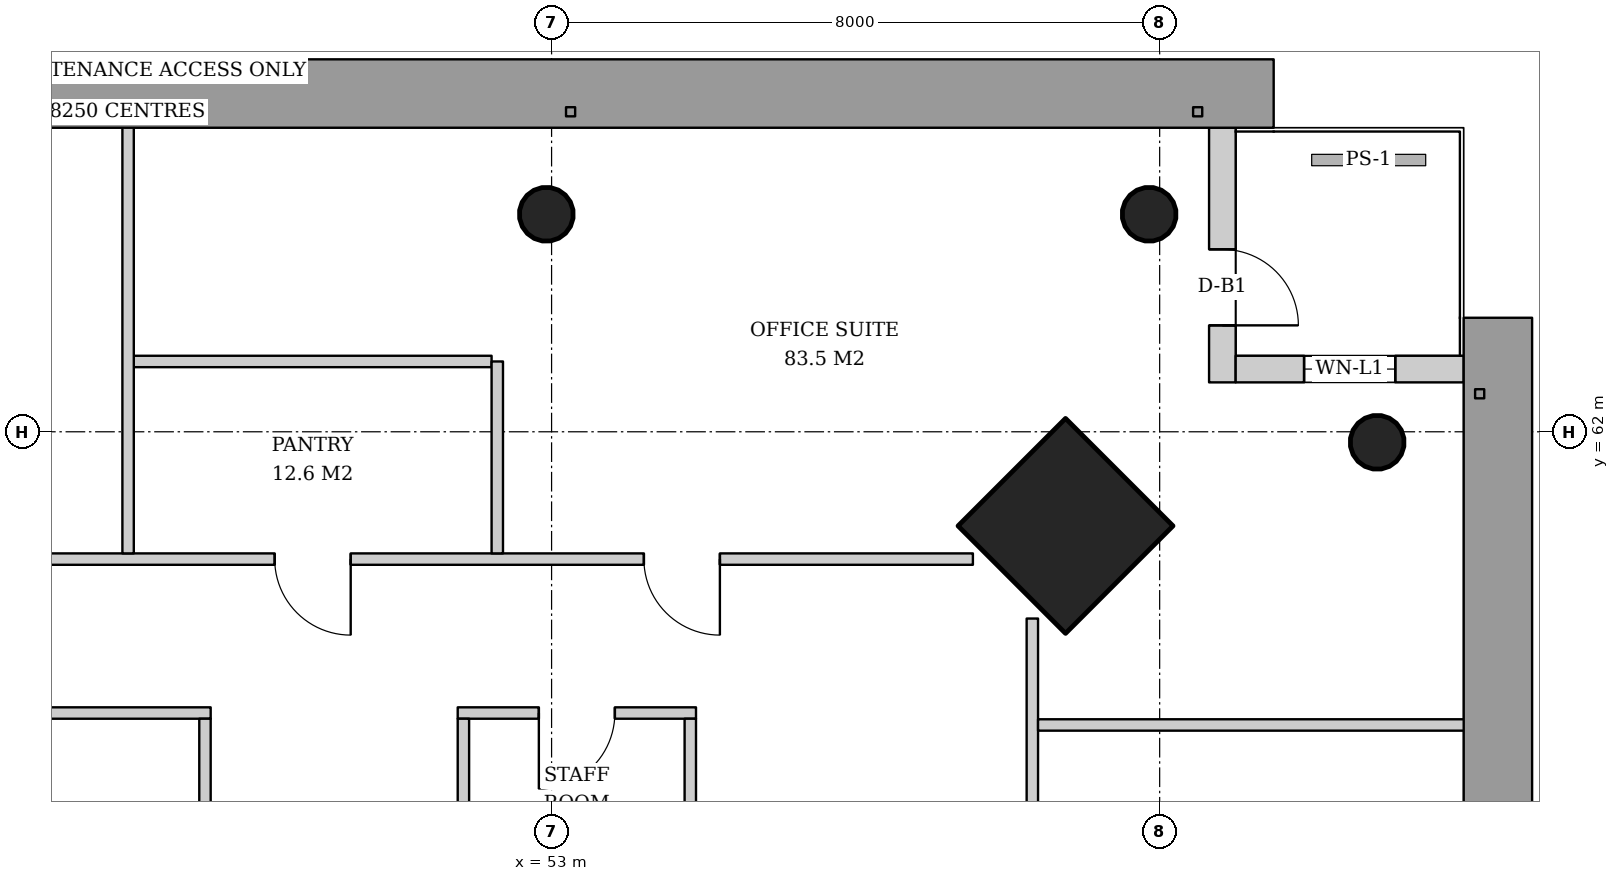
"""IFC4 building model, lengths in metres.
Left out: names, types, materials, properties, quantities, classifications, styles, units other than length and angle.
Written with IfcOpenShell. Run it as: python <this file> out.ifc"""

import sys

from ifc_helpers import new_model, si_unit, direction, frame, frame_2d, origin, origin_2d, place, context, subcontext, project, spatial, rectangle, hollow_circle, extrude, element, fill, save


model = new_model("IFC4")
c1 = context("Model", 3, precision=1e-05, world=origin(), true_north=direction((0.0, 1.0)))
c2 = subcontext(c1, "Body", "Model", "MODEL_VIEW")
j1 = project(units=[si_unit("LENGTHUNIT", "METRE"), si_unit("PLANEANGLEUNIT", "RADIAN")], contexts=[c1])
p1 = place(None, origin())
s1 = spatial("IfcSite", under=j1, at=p1, CompositionType="ELEMENT")
p2 = place(p1, origin())
s2 = spatial("IfcBuilding", under=s1, at=p2, CompositionType="ELEMENT")
p3 = place(p2, frame((0.0, 0.0, 180.6)))
s3 = spatial("IfcBuildingStorey", under=s2, at=p3, CompositionType="ELEMENT", Elevation=180.6)
p4 = place(p3, frame((59.8, 60.8, 0.0), z_axis=(-0.031964207655, -0.031964207655, 0.998977766949), x_axis=(0.707106781187, -0.707106781187, 0.0)))
e1 = element("IfcColumn", 1, at=p4, inside=s3, PredefinedType="COLUMN", context=c2, shape_type="SweptSolid", body=[
    extrude(rectangle(XDim=2.0, YDim=2.0, at=origin_2d()), origin(), (0.0, 0.0, 1.0), 3.804),
])
for number, where, z_axis, x_axis in (
    (2, (63.9, 61.9, 0.0), (-0.032, -0.032, 0.999), (0.707, -0.707, 0.0)),
    (3, (60.9, 64.9, 0.0), (-0.032, -0.032, 0.999), (0.707, -0.707, 0.0)),
):
    element("IfcColumn", number, at=place(p3, frame(where, z_axis=z_axis, x_axis=x_axis)), inside=s3, PredefinedType="COLUMN", context=c2, shape_type="SweptSolid", body=[
        extrude(hollow_circle(Radius=0.355, WallThickness=0.025, at=origin_2d()), origin(), (0.0, 0.0, 1.0), 3.804),
    ])
p5 = place(p3, frame((52.95, 64.9, 0.0), z_axis=(-0.015924069971, -0.031912349901, 0.999363810591), x_axis=(0.894786976326, -0.446493300058, 0.0)))
e4 = element("IfcColumn", 4, at=p5, inside=s3, PredefinedType="COLUMN", context=c2, shape_type="SweptSolid", body=[
    extrude(hollow_circle(Radius=0.355, WallThickness=0.025, at=origin_2d()), origin(), (0.0, 0.0, 1.0), 3.802),
])
p6 = place(p3, frame((61.825, 66.0, 0.0), z_axis=(0.0, 0.0, 1.0), x_axis=(0.0, -1.0, 0.0)))
e5 = element("IfcWall", 5, at=p6, inside=s3, PredefinedType="SOLIDWALL", context=c2, shape_type="SweptSolid", body=[
    extrude(rectangle(XDim=3.35, YDim=0.35, at=frame_2d((1.675, 0.0))), origin(), (0.0, 0.0, 1.0), 3.62),
])
p7 = place(p6, frame((1.6, 0.0, 0.0)))
e6 = element("IfcOpeningElement", 6, at=p7, cuts=e5, PredefinedType="OPENING", context=c2, shape_type="SweptSolid", body=[
    extrude(rectangle(XDim=1.0, YDim=2.4, at=frame_2d((0.5, 1.2))), frame((0.0, 0.185, 0.0), z_axis=(0.0, -1.0, 0.0), x_axis=(1.0, 0.0, 0.0)), (0.0, 0.0, 1.0), 0.37),
])
p8 = place(p3, frame((62.0, 62.825, 0.0), z_axis=(0.0, 0.0, 1.0), x_axis=(1.0, 0.0, 0.0)))
e7 = element("IfcWall", 7, at=p8, inside=s3, PredefinedType="SOLIDWALL", context=c2, shape_type="SweptSolid", body=[
    extrude(rectangle(XDim=3.0, YDim=0.35, at=frame_2d((1.5, 0.0))), origin(), (0.0, 0.0, 1.0), 3.62),
])
p9 = place(p8, frame((0.9, 0.0, 0.6)))
e8 = element("IfcOpeningElement", 8, at=p9, cuts=e7, PredefinedType="OPENING", context=c2, shape_type="SweptSolid", body=[
    extrude(rectangle(XDim=1.2, YDim=2.55, at=frame_2d((0.6, 1.275))), frame((0.0, 0.185, 0.0), z_axis=(0.0, -1.0, 0.0), x_axis=(1.0, 0.0, 0.0)), (0.0, 0.0, 1.0), 0.37),
])
p10 = place(p3, frame((54.9, 58.3, 0.0), z_axis=(0.0, 0.0, 1.0), x_axis=(-1.0, 0.0, 0.0)))
e9 = element("IfcWall", 9, at=p10, inside=s3, PredefinedType="PARTITIONING", context=c2, shape_type="SweptSolid", body=[
    extrude(rectangle(XDim=3.135, YDim=0.15, at=frame_2d((1.567, 0.0))), origin(), (0.0, 0.0, 1.0), 2.92),
])
p11 = place(p10, frame((1.067, 0.0, 0.0)))
e10 = element("IfcOpeningElement", 10, at=p11, cuts=e9, PredefinedType="OPENING", context=c2, shape_type="SweptSolid", body=[
    extrude(rectangle(XDim=1.0, YDim=2.1, at=frame_2d((0.5, 1.05))), frame((0.0, 0.085, 0.0), z_axis=(0.0, -1.0, 0.0), x_axis=(1.0, 0.0, 0.0)), (0.0, 0.0, 1.0), 0.17),
])
p12 = place(p3, frame((54.825, 55.9, 0.0), z_axis=(0.0, 0.0, 1.0), x_axis=(0.0, 1.0, 0.0)))
e11 = element("IfcWall", 11, at=p12, inside=s3, PredefinedType="PARTITIONING", context=c2, shape_type="SweptSolid", body=[
    extrude(rectangle(XDim=2.325, YDim=0.15, at=frame_2d((1.163, 0.0))), origin(), (0.0, 0.0, 1.0), 2.867),
])
p13 = place(p3, frame((51.84, 55.9, 0.0), z_axis=(0.0, 0.0, 1.0), x_axis=(0.0, 1.0, 0.0)))
e12 = element("IfcWall", 12, at=p13, inside=s3, PredefinedType="PARTITIONING", context=c2, shape_type="SweptSolid", body=[
    extrude(rectangle(XDim=2.325, YDim=0.15, at=frame_2d((1.163, 0.0))), origin(), (0.0, 0.0, 1.0), 3.62),
])
p14 = place(p3, frame((48.515, 58.3, 0.0), z_axis=(0.0, 0.0, 1.0), x_axis=(-1.0, 0.0, 0.0)))
e13 = element("IfcWall", 13, at=p14, inside=s3, PredefinedType="PARTITIONING", context=c2, shape_type="SweptSolid", body=[
    extrude(rectangle(XDim=7.278, YDim=0.15, at=frame_2d((3.639, 0.0))), origin(), (0.0, 0.0, 1.0), 2.867),
])
p15 = place(p14, frame((3.139, 0.0, 0.0)))
e14 = element("IfcOpeningElement", 14, at=p15, cuts=e13, PredefinedType="OPENING", context=c2, shape_type="SweptSolid", body=[
    extrude(rectangle(XDim=1.0, YDim=2.1, at=frame_2d((0.5, 1.05))), frame((0.0, 0.085, 0.0), z_axis=(0.0, -1.0, 0.0), x_axis=(1.0, 0.0, 0.0)), (0.0, 0.0, 1.0), 0.17),
])
p16 = place(p3, frame((48.44, 55.9, 0.0), z_axis=(0.0, 0.0, 1.0), x_axis=(0.0, 1.0, 0.0)))
e15 = element("IfcWall", 15, at=p16, inside=s3, PredefinedType="PARTITIONING", context=c2, shape_type="SweptSolid", body=[
    extrude(rectangle(XDim=2.325, YDim=0.15, at=frame_2d((1.163, 0.0))), origin(), (0.0, 0.0, 1.0), 3.62),
])
p17 = place(p3, frame((59.325, 32.457, 0.0), z_axis=(0.0, 0.0, 1.0), x_axis=(0.0, 1.0, 0.0)))
e16 = element("IfcWall", 16, at=p17, inside=s3, PredefinedType="PARTITIONING", context=c2, shape_type="SweptSolid", body=[
    extrude(rectangle(XDim=27.086, YDim=0.15, at=frame_2d((13.543, 0.0))), origin(), (0.0, 0.0, 1.0), 2.867),
])
p18 = place(p17, frame((3.329, 0.0, 0.0)))
e17 = element("IfcOpeningElement", 17, at=p18, cuts=e16, PredefinedType="OPENING", context=c2, shape_type="SweptSolid", body=[
    extrude(rectangle(XDim=1.0, YDim=2.1, at=frame_2d((0.5, 1.05))), frame((0.0, 0.085, 0.0), z_axis=(0.0, -1.0, 0.0), x_axis=(1.0, 0.0, 0.0)), (0.0, 0.0, 1.0), 0.17),
])
p19 = place(p17, frame((8.186, 0.0, 0.0)))
e18 = element("IfcOpeningElement", 18, at=p19, cuts=e16, PredefinedType="OPENING", context=c2, shape_type="SweptSolid", body=[
    extrude(rectangle(XDim=1.0, YDim=2.1, at=frame_2d((0.5, 1.05))), frame((0.0, 0.085, 0.0), z_axis=(0.0, -1.0, 0.0), x_axis=(1.0, 0.0, 0.0)), (0.0, 0.0, 1.0), 0.17),
])
p20 = place(p17, frame((13.043, 0.0, 0.0)))
e19 = element("IfcOpeningElement", 19, at=p20, cuts=e16, PredefinedType="OPENING", context=c2, shape_type="SweptSolid", body=[
    extrude(rectangle(XDim=1.0, YDim=2.1, at=frame_2d((0.5, 1.05))), frame((0.0, 0.085, 0.0), z_axis=(0.0, -1.0, 0.0), x_axis=(1.0, 0.0, 0.0)), (0.0, 0.0, 1.0), 0.17),
])
p21 = place(p17, frame((17.9, 0.0, 0.0)))
e20 = element("IfcOpeningElement", 20, at=p21, cuts=e16, PredefinedType="OPENING", context=c2, shape_type="SweptSolid", body=[
    extrude(rectangle(XDim=1.0, YDim=2.1, at=frame_2d((0.5, 1.05))), frame((0.0, 0.085, 0.0), z_axis=(0.0, -1.0, 0.0), x_axis=(1.0, 0.0, 0.0)), (0.0, 0.0, 1.0), 0.17),
])
p22 = place(p17, frame((22.757, 0.0, 0.0)))
e21 = element("IfcOpeningElement", 21, at=p22, cuts=e16, PredefinedType="OPENING", context=c2, shape_type="SweptSolid", body=[
    extrude(rectangle(XDim=1.0, YDim=2.1, at=frame_2d((0.5, 1.05))), frame((0.0, 0.085, 0.0), z_axis=(0.0, -1.0, 0.0), x_axis=(1.0, 0.0, 0.0)), (0.0, 0.0, 1.0), 0.17),
])
p23 = place(p3, frame((59.4, 58.143, 0.0), z_axis=(0.0, 0.0, 1.0), x_axis=(1.0, 0.0, 0.0)))
e22 = element("IfcWall", 22, at=p23, inside=s3, PredefinedType="PARTITIONING", context=c2, shape_type="SweptSolid", body=[
    extrude(rectangle(XDim=5.64, YDim=0.15, at=frame_2d((2.82, 0.0))), origin(), (0.0, 0.0, 1.0), 3.12),
])
p24 = place(p3, frame((52.211, 62.925, 0.0), z_axis=(0.0, 0.0, 1.0), x_axis=(-1.0, 0.0, 0.0)))
e23 = element("IfcWall", 23, at=p24, inside=s3, PredefinedType="PARTITIONING", context=c2, shape_type="SweptSolid", body=[
    extrude(rectangle(XDim=4.707, YDim=0.15, at=frame_2d((2.354, 0.0))), origin(), (0.0, 0.0, 1.0), 2.867),
])
p25 = place(p3, frame((58.543, 60.325, 0.0), z_axis=(0.0, 0.0, 1.0), x_axis=(-1.0, 0.0, 0.0)))
e24 = element("IfcWall", 24, at=p25, inside=s3, PredefinedType="PARTITIONING", context=c2, shape_type="SweptSolid", body=[
    extrude(rectangle(XDim=27.086, YDim=0.15, at=frame_2d((13.543, 0.0))), origin(), (0.0, 0.0, 1.0), 2.867),
])
p26 = place(p25, frame((3.329, 0.0, 0.0)))
e25 = element("IfcOpeningElement", 25, at=p26, cuts=e24, PredefinedType="OPENING", context=c2, shape_type="SweptSolid", body=[
    extrude(rectangle(XDim=1.0, YDim=2.1, at=frame_2d((0.5, 1.05))), frame((0.0, 0.085, 0.0), z_axis=(0.0, -1.0, 0.0), x_axis=(1.0, 0.0, 0.0)), (0.0, 0.0, 1.0), 0.17),
])
p27 = place(p25, frame((8.186, 0.0, 0.0)))
e26 = element("IfcOpeningElement", 26, at=p27, cuts=e24, PredefinedType="OPENING", context=c2, shape_type="SweptSolid", body=[
    extrude(rectangle(XDim=1.0, YDim=2.1, at=frame_2d((0.5, 1.05))), frame((0.0, 0.085, 0.0), z_axis=(0.0, -1.0, 0.0), x_axis=(1.0, 0.0, 0.0)), (0.0, 0.0, 1.0), 0.17),
])
p28 = place(p25, frame((13.043, 0.0, 0.0)))
e27 = element("IfcOpeningElement", 27, at=p28, cuts=e24, PredefinedType="OPENING", context=c2, shape_type="SweptSolid", body=[
    extrude(rectangle(XDim=1.0, YDim=2.1, at=frame_2d((0.5, 1.05))), frame((0.0, 0.085, 0.0), z_axis=(0.0, -1.0, 0.0), x_axis=(1.0, 0.0, 0.0)), (0.0, 0.0, 1.0), 0.17),
])
p29 = place(p25, frame((17.9, 0.0, 0.0)))
e28 = element("IfcOpeningElement", 28, at=p29, cuts=e24, PredefinedType="OPENING", context=c2, shape_type="SweptSolid", body=[
    extrude(rectangle(XDim=1.0, YDim=2.1, at=frame_2d((0.5, 1.05))), frame((0.0, 0.085, 0.0), z_axis=(0.0, -1.0, 0.0), x_axis=(1.0, 0.0, 0.0)), (0.0, 0.0, 1.0), 0.17),
])
p30 = place(p3, frame((52.286, 60.4, 0.0), z_axis=(0.0, 0.0, 1.0), x_axis=(0.0, 1.0, 0.0)))
e29 = element("IfcWall", 29, at=p30, inside=s3, PredefinedType="PARTITIONING", context=c2, shape_type="SweptSolid", body=[
    extrude(rectangle(XDim=2.525, YDim=0.15, at=frame_2d((1.263, 0.0))), origin(), (0.0, 0.0, 1.0), 3.62),
])
p31 = place(p3, frame((47.428, 60.4, 0.0), z_axis=(0.0, 0.0, 1.0), x_axis=(0.0, 1.0, 0.0)))
e30 = element("IfcWall", 30, at=p31, inside=s3, PredefinedType="PARTITIONING", context=c2, shape_type="SweptSolid", body=[
    extrude(rectangle(XDim=5.64, YDim=0.15, at=frame_2d((2.82, 0.0))), origin(), (0.0, 0.0, 1.0), 3.12),
])
p32 = place(p7, origin())
e31 = element("IfcDoor", 31, at=p32, inside=s3, OperationType="SINGLE_SWING_RIGHT", PredefinedType="DOOR", context=c2, shape_type="SweptSolid", body=[
    extrude(rectangle(XDim=1.0, YDim=2.4, at=frame_2d((0.5, 1.2))), frame((0.0, 0.025, 0.0), z_axis=(0.0, -1.0, 0.0), x_axis=(1.0, 0.0, 0.0)), (0.0, 0.0, 1.0), 0.05),
])
fill(e6, e31)
p33 = place(p9, origin())
e32 = element("IfcWindow", 32, at=p33, inside=s3, PartitioningType="SINGLE_PANEL", PredefinedType="WINDOW", context=c2, shape_type="SweptSolid", body=[
    extrude(rectangle(XDim=1.2, YDim=2.55, at=frame_2d((0.6, 1.275))), frame((0.0, 0.03, 0.0), z_axis=(0.0, -1.0, 0.0), x_axis=(1.0, 0.0, 0.0)), (0.0, 0.0, 1.0), 0.06),
])
fill(e8, e32)
p34 = place(p11, origin())
e33 = element("IfcDoor", 33, at=p34, inside=s3, OperationType="SINGLE_SWING_RIGHT", PredefinedType="DOOR", context=c2, shape_type="SweptSolid", body=[
    extrude(rectangle(XDim=1.0, YDim=2.1, at=frame_2d((0.5, 1.05))), frame((0.0, 0.025, 0.0), z_axis=(0.0, -1.0, 0.0), x_axis=(1.0, 0.0, 0.0)), (0.0, 0.0, 1.0), 0.05),
])
fill(e10, e33)
p35 = place(p26, origin())
e34 = element("IfcDoor", 34, at=p35, inside=s3, OperationType="SINGLE_SWING_LEFT", PredefinedType="DOOR", context=c2, shape_type="SweptSolid", body=[
    extrude(rectangle(XDim=1.0, YDim=2.1, at=frame_2d((0.5, 1.05))), frame((0.0, 0.025, 0.0), z_axis=(0.0, -1.0, 0.0), x_axis=(1.0, 0.0, 0.0)), (0.0, 0.0, 1.0), 0.05),
])
fill(e25, e34)
p36 = place(p27, origin())
e35 = element("IfcDoor", 35, at=p36, inside=s3, OperationType="SINGLE_SWING_LEFT", PredefinedType="DOOR", context=c2, shape_type="SweptSolid", body=[
    extrude(rectangle(XDim=1.0, YDim=2.1, at=frame_2d((0.5, 1.05))), frame((0.0, 0.025, 0.0), z_axis=(0.0, -1.0, 0.0), x_axis=(1.0, 0.0, 0.0)), (0.0, 0.0, 1.0), 0.05),
])
fill(e26, e35)
save(model, sys.argv[1])
